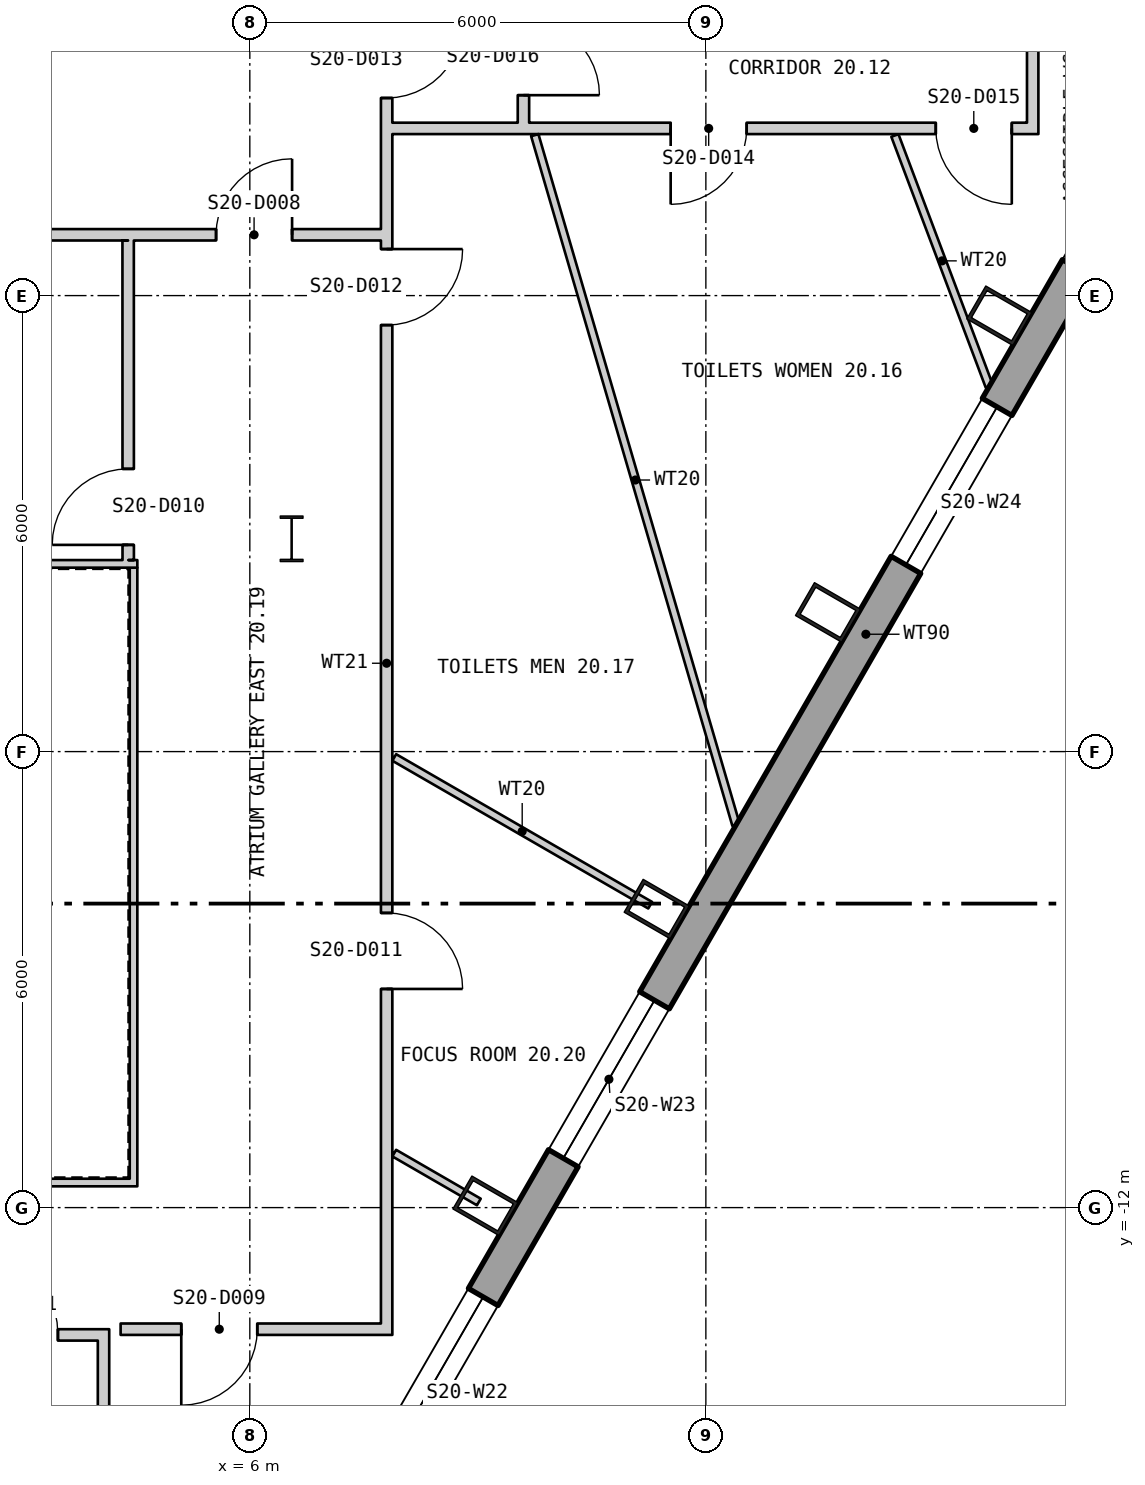
"""IFC4 building model, lengths in metres.
Left out: names, types, materials, properties, quantities, classifications, styles, units other than length and angle.
Written with IfcOpenShell. Run it as: python <this file> out.ifc"""

import sys

from ifc_helpers import new_model, si_unit, direction, frame, frame_2d, origin, origin_2d, place, context, subcontext, project, spatial, polyline, rectangle, hollow_rectangle, i_section, outline, extrude, element, fill, save


model = new_model("IFC4")
c1 = context("Model", 3, precision=1e-05, world=origin(), true_north=direction((0.0, 1.0)))
c2 = subcontext(c1, "Body", "Model", "MODEL_VIEW")
j1 = project(units=[si_unit("LENGTHUNIT", "METRE"), si_unit("PLANEANGLEUNIT", "RADIAN")], contexts=[c1])
p1 = place(None, origin())
s1 = spatial("IfcSite", under=j1, at=p1, CompositionType="ELEMENT")
p2 = place(p1, origin())
s2 = spatial("IfcBuilding", under=s1, at=p2, CompositionType="ELEMENT")
p3 = place(p2, frame((0.0, 0.0, 268.8)))
s3 = spatial("IfcBuildingStorey", under=s2, at=p3, CompositionType="ELEMENT", Elevation=268.8)
for number, where, z_axis, x_axis in (
    (1, (9.1, -11.976, 0.0), (0.0, 0.0, 1.0), (0.5, 0.866, 0.0)),
    (2, (11.353, -8.072, 0.0), (0.0, 0.0, 1.0), (0.5, 0.866, 0.0)),
    (3, (13.607, -4.168, 0.0), (0.0, 0.0, 1.0), (0.5, 0.866, 0.0)),
    (4, (15.861, -0.265, 0.0), (0.0, 0.0, 1.0), (0.5, 0.866, 0.0)),
):
    element("IfcColumn", number, at=place(p3, frame(where, z_axis=z_axis, x_axis=x_axis)), inside=s3, PredefinedType="COLUMN", context=c2, shape_type="SweptSolid", body=[
        extrude(hollow_rectangle(XDim=0.5, YDim=0.7, WallThickness=0.045, at=origin_2d()), origin(), (0.0, 0.0, 1.0), 3.9),
    ])
p4 = place(p3, frame((6.55, -3.2, 0.0), z_axis=(0.0, 0.0, 1.0), x_axis=(1.0, 0.0, 0.0)))
e5 = element("IfcColumn", 5, at=p4, inside=s3, PredefinedType="COLUMN", context=c2, shape_type="SweptSolid", body=[
    extrude(i_section(OverallWidth=0.3, OverallDepth=0.6, WebThickness=0.015, FlangeThickness=0.03, at=origin_2d()), origin(), (0.0, 0.0, 1.0), 3.9),
])
p5 = place(p3, frame((2.67, -24.262, -0.18), z_axis=(0.0, 0.0, 1.0), x_axis=(0.499999764979, 0.866025539474, 0.0)))
e6 = element("IfcWall", 6, at=p5, inside=s3, PredefinedType="SOLIDWALL", context=c2, shape_type="SweptSolid", body=[
    extrude(outline(polyline([(-0.13, -0.225), (45.87, -0.225), (45.61, 0.225), (0.13, 0.225), (-0.13, -0.225)])), origin(), (0.0, 0.0, 1.0), 3.68),
])
p6 = place(p5, frame((1.424, 0.0, 1.08)))
e7 = element("IfcOpeningElement", 7, at=p6, cuts=e6, PredefinedType="OPENING", context=c2, shape_type="SweptSolid", body=[
    extrude(rectangle(XDim=2.4, YDim=2.0, at=frame_2d((1.2, 1.0))), frame((0.0, 0.235, 0.0), z_axis=(0.0, -1.0, 0.0), x_axis=(1.0, 0.0, 0.0)), (0.0, 0.0, 1.0), 0.47),
])
p7 = place(p5, frame((5.893, 0.0, 1.08)))
e8 = element("IfcOpeningElement", 8, at=p7, cuts=e6, PredefinedType="OPENING", context=c2, shape_type="SweptSolid", body=[
    extrude(rectangle(XDim=2.4, YDim=2.0, at=frame_2d((1.2, 1.0))), frame((0.0, 0.235, 0.0), z_axis=(0.0, -1.0, 0.0), x_axis=(1.0, 0.0, 0.0)), (0.0, 0.0, 1.0), 0.47),
])
p8 = place(p5, frame((10.401, 0.0, 1.08)))
e9 = element("IfcOpeningElement", 9, at=p8, cuts=e6, PredefinedType="OPENING", context=c2, shape_type="SweptSolid", body=[
    extrude(rectangle(XDim=2.4, YDim=2.0, at=frame_2d((1.2, 1.0))), frame((0.0, 0.235, 0.0), z_axis=(0.0, -1.0, 0.0), x_axis=(1.0, 0.0, 0.0)), (0.0, 0.0, 1.0), 0.47),
])
p9 = place(p5, frame((14.909, 0.0, 1.08)))
e10 = element("IfcOpeningElement", 10, at=p9, cuts=e6, PredefinedType="OPENING", context=c2, shape_type="SweptSolid", body=[
    extrude(rectangle(XDim=2.4, YDim=2.0, at=frame_2d((1.2, 1.0))), frame((0.0, 0.235, 0.0), z_axis=(0.0, -1.0, 0.0), x_axis=(1.0, 0.0, 0.0)), (0.0, 0.0, 1.0), 0.47),
])
p10 = place(p5, frame((23.924, 0.0, 1.08)))
e11 = element("IfcOpeningElement", 11, at=p10, cuts=e6, PredefinedType="OPENING", context=c2, shape_type="SweptSolid", body=[
    extrude(rectangle(XDim=2.4, YDim=2.0, at=frame_2d((1.2, 1.0))), frame((0.0, 0.235, 0.0), z_axis=(0.0, -1.0, 0.0), x_axis=(1.0, 0.0, 0.0)), (0.0, 0.0, 1.0), 0.47),
])
p11 = place(p5, frame((28.431, 0.0, 1.08)))
e12 = element("IfcOpeningElement", 12, at=p11, cuts=e6, PredefinedType="OPENING", context=c2, shape_type="SweptSolid", body=[
    extrude(rectangle(XDim=2.4, YDim=2.0, at=frame_2d((1.2, 1.0))), frame((0.0, 0.235, 0.0), z_axis=(0.0, -1.0, 0.0), x_axis=(1.0, 0.0, 0.0)), (0.0, 0.0, 1.0), 0.47),
])
p12 = place(p5, frame((32.939, 0.0, 1.08)))
e13 = element("IfcOpeningElement", 13, at=p12, cuts=e6, PredefinedType="OPENING", context=c2, shape_type="SweptSolid", body=[
    extrude(rectangle(XDim=2.4, YDim=2.0, at=frame_2d((1.2, 1.0))), frame((0.0, 0.235, 0.0), z_axis=(0.0, -1.0, 0.0), x_axis=(1.0, 0.0, 0.0)), (0.0, 0.0, 1.0), 0.47),
])
p13 = place(p5, frame((37.447, 0.0, 1.08)))
e14 = element("IfcOpeningElement", 14, at=p13, cuts=e6, PredefinedType="OPENING", context=c2, shape_type="SweptSolid", body=[
    extrude(rectangle(XDim=2.4, YDim=2.0, at=frame_2d((1.2, 1.0))), frame((0.0, 0.235, 0.0), z_axis=(0.0, -1.0, 0.0), x_axis=(1.0, 0.0, 0.0)), (0.0, 0.0, 1.0), 0.47),
])
p14 = place(p5, frame((41.916, 0.0, 1.08)))
e15 = element("IfcOpeningElement", 15, at=p14, cuts=e6, PredefinedType="OPENING", context=c2, shape_type="SweptSolid", body=[
    extrude(rectangle(XDim=2.4, YDim=2.0, at=frame_2d((1.2, 1.0))), frame((0.0, 0.235, 0.0), z_axis=(0.0, -1.0, 0.0), x_axis=(1.0, 0.0, 0.0)), (0.0, 0.0, 1.0), 0.47),
])
p15 = place(p3, frame((-4.52, -11.67, 0.0), z_axis=(0.0, 0.0, 1.0), x_axis=(1.0, 0.0, 0.0)))
e16 = element("IfcWall", 16, at=p15, inside=s3, PredefinedType="PARTITIONING", context=c2, shape_type="SweptSolid", body=[
    extrude(rectangle(XDim=9.04, YDim=0.1, at=frame_2d((4.52, 0.0))), origin(), (0.0, 0.0, 1.0), 3.7),
])
p16 = place(p3, frame((4.47, -11.62, 0.0), z_axis=(0.0, 0.0, 1.0), x_axis=(0.0, 1.0, 0.0)))
e17 = element("IfcWall", 17, at=p16, inside=s3, PredefinedType="PARTITIONING", context=c2, shape_type="SweptSolid", body=[
    extrude(rectangle(XDim=8.04, YDim=0.1, at=frame_2d((4.02, 0.0))), origin(), (0.0, 0.0, 1.0), 3.7),
])
p17 = place(p3, frame((4.52, -3.53, 0.0), z_axis=(0.0, 0.0, 1.0), x_axis=(-1.0, 0.0, 0.0)))
e18 = element("IfcWall", 18, at=p17, inside=s3, PredefinedType="PARTITIONING", context=c2, shape_type="SweptSolid", body=[
    extrude(rectangle(XDim=9.04, YDim=0.1, at=frame_2d((4.52, 0.0))), origin(), (0.0, 0.0, 1.0), 3.7),
])
p18 = place(p3, frame((4.075, -16.15, 0.0), z_axis=(0.0, 0.0, 1.0), x_axis=(0.0, 1.0, 0.0)))
e19 = element("IfcWall", 19, at=p18, inside=s3, PredefinedType="PARTITIONING", context=c2, shape_type="SweptSolid", body=[
    extrude(rectangle(XDim=2.4, YDim=0.15, at=frame_2d((1.2, 0.0))), origin(), (0.0, 0.0, 1.0), 3.7),
])
p19 = place(p3, frame((1.55, -13.675, 0.0), z_axis=(0.0, 0.0, 1.0), x_axis=(1.0, 0.0, 0.0)))
e20 = element("IfcWall", 20, at=p19, inside=s3, PredefinedType="PARTITIONING", context=c2, shape_type="SweptSolid", body=[
    extrude(rectangle(XDim=2.6, YDim=0.15, at=frame_2d((1.3, 0.0))), origin(), (0.0, 0.0, 1.0), 2.79),
])
p20 = place(p19, frame((0.675, 0.0, 0.0)))
e21 = element("IfcOpeningElement", 21, at=p20, cuts=e20, PredefinedType="OPENING", context=c2, shape_type="SweptSolid", body=[
    extrude(rectangle(XDim=1.25, YDim=2.1, at=frame_2d((0.625, 1.05))), frame((0.0, 0.085, 0.0), z_axis=(0.0, -1.0, 0.0), x_axis=(1.0, 0.0, 0.0)), (0.0, 0.0, 1.0), 0.17),
])
p21 = place(p3, frame((-7.725, 0.8, 0.0), z_axis=(0.0, 0.0, 1.0), x_axis=(1.0, 0.0, 0.0)))
e22 = element("IfcWall", 22, at=p21, inside=s3, PredefinedType="PARTITIONING", context=c2, shape_type="SweptSolid", body=[
    extrude(rectangle(XDim=15.45, YDim=0.15, at=frame_2d((7.725, 0.0))), origin(), (0.0, 0.0, 1.0), 3.7),
])
p22 = place(p21, frame((1.168, 0.0, 0.0)))
e23 = element("IfcOpeningElement", 23, at=p22, cuts=e22, PredefinedType="OPENING", context=c2, shape_type="SweptSolid", body=[
    extrude(rectangle(XDim=1.0, YDim=2.1, at=frame_2d((0.5, 1.05))), frame((0.0, 0.085, 0.0), z_axis=(0.0, -1.0, 0.0), x_axis=(1.0, 0.0, 0.0)), (0.0, 0.0, 1.0), 0.17),
])
p23 = place(p21, frame((6.524, 0.0, 0.0)))
e24 = element("IfcOpeningElement", 24, at=p23, cuts=e22, PredefinedType="OPENING", context=c2, shape_type="SweptSolid", body=[
    extrude(rectangle(XDim=1.0, YDim=2.1, at=frame_2d((0.5, 1.05))), frame((0.0, 0.085, 0.0), z_axis=(0.0, -1.0, 0.0), x_axis=(1.0, 0.0, 0.0)), (0.0, 0.0, 1.0), 0.17),
])
p24 = place(p21, frame((13.281, 0.0, 0.0)))
e25 = element("IfcOpeningElement", 25, at=p24, cuts=e22, PredefinedType="OPENING", context=c2, shape_type="SweptSolid", body=[
    extrude(rectangle(XDim=1.0, YDim=2.1, at=frame_2d((0.5, 1.05))), frame((0.0, 0.085, 0.0), z_axis=(0.0, -1.0, 0.0), x_axis=(1.0, 0.0, 0.0)), (0.0, 0.0, 1.0), 0.17),
])
p25 = place(p3, frame((4.3, -13.6, 0.0), z_axis=(0.0, 0.0, 1.0), x_axis=(1.0, 0.0, 0.0)))
e26 = element("IfcWall", 26, at=p25, inside=s3, PredefinedType="PARTITIONING", context=c2, shape_type="SweptSolid", body=[
    extrude(rectangle(XDim=3.425, YDim=0.15, at=frame_2d((1.712, 0.0))), origin(), (0.0, 0.0, 1.0), 2.79),
])
p26 = place(p25, frame((0.798, 0.0, 0.0)))
e27 = element("IfcOpeningElement", 27, at=p26, cuts=e26, PredefinedType="OPENING", context=c2, shape_type="SweptSolid", body=[
    extrude(rectangle(XDim=1.0, YDim=2.1, at=frame_2d((0.5, 1.05))), frame((0.0, 0.085, 0.0), z_axis=(0.0, -1.0, 0.0), x_axis=(1.0, 0.0, 0.0)), (0.0, 0.0, 1.0), 0.17),
])
p27 = place(p3, frame((4.399, 0.725, 0.0), z_axis=(0.0, 0.0, 1.0), x_axis=(0.000237812122, -0.999999971723, 0.0)))
e28 = element("IfcWall", 28, at=p27, inside=s3, PredefinedType="PARTITIONING", context=c2, shape_type="SweptSolid", body=[
    extrude(rectangle(XDim=4.205, YDim=0.15, at=frame_2d((2.103, 0.0))), origin(), (0.0, 0.0, 1.0), 3.7),
])
p28 = place(p27, frame((3.005, 0.0, 0.0)))
e29 = element("IfcOpeningElement", 29, at=p28, cuts=e28, PredefinedType="OPENING", context=c2, shape_type="SweptSolid", body=[
    extrude(rectangle(XDim=1.0, YDim=2.1, at=frame_2d((0.5, 1.05))), frame((0.0, 0.085, 0.0), z_axis=(0.0, -1.0, 0.0), x_axis=(1.0, 0.0, 0.0)), (0.0, 0.0, 1.0), 0.17),
])
p29 = place(p3, frame((7.8, -13.675, 0.0), z_axis=(0.0, 0.0, 1.0), x_axis=(0.0, 1.0, 0.0)))
e30 = element("IfcWall", 30, at=p29, inside=s3, PredefinedType="PARTITIONING", context=c2, shape_type="SweptSolid", body=[
    extrude(rectangle(XDim=17.675, YDim=0.15, at=frame_2d((8.838, 0.0))), origin(), (0.0, 0.0, 1.0), 3.7),
])
p30 = place(p29, frame((4.552, 0.0, 0.0)))
e31 = element("IfcOpeningElement", 31, at=p30, cuts=e30, PredefinedType="OPENING", context=c2, shape_type="SweptSolid", body=[
    extrude(rectangle(XDim=1.0, YDim=2.1, at=frame_2d((0.5, 1.05))), frame((0.0, 0.085, 0.0), z_axis=(0.0, -1.0, 0.0), x_axis=(1.0, 0.0, 0.0)), (0.0, 0.0, 1.0), 0.17),
])
p31 = place(p29, frame((13.287, 0.0, 0.0)))
e32 = element("IfcOpeningElement", 32, at=p31, cuts=e30, PredefinedType="OPENING", context=c2, shape_type="SweptSolid", body=[
    extrude(rectangle(XDim=1.0, YDim=2.1, at=frame_2d((0.5, 1.05))), frame((0.0, 0.085, 0.0), z_axis=(0.0, -1.0, 0.0), x_axis=(1.0, 0.0, 0.0)), (0.0, 0.0, 1.0), 0.17),
])
p32 = place(p29, frame((16.275, 0.0, 0.0)))
e33 = element("IfcOpeningElement", 33, at=p32, cuts=e30, PredefinedType="OPENING", context=c2, shape_type="SweptSolid", body=[
    extrude(rectangle(XDim=1.0, YDim=2.1, at=frame_2d((0.5, 1.05))), frame((0.0, 0.085, 0.0), z_axis=(0.0, -1.0, 0.0), x_axis=(1.0, 0.0, 0.0)), (0.0, 0.0, 1.0), 0.17),
])
p33 = place(p3, frame((7.875, 2.2, 0.0), z_axis=(0.0, 0.0, 1.0), x_axis=(1.0, 0.0, 0.0)))
e34 = element("IfcWall", 34, at=p33, inside=s3, PredefinedType="PARTITIONING", context=c2, shape_type="SweptSolid", body=[
    extrude(rectangle(XDim=8.35, YDim=0.15, at=frame_2d((4.175, 0.0))), origin(), (0.0, 0.0, 1.0), 3.7),
])
p34 = place(p33, frame((3.662, 0.0, 0.0)))
e35 = element("IfcOpeningElement", 35, at=p34, cuts=e34, PredefinedType="OPENING", context=c2, shape_type="SweptSolid", body=[
    extrude(rectangle(XDim=1.0, YDim=2.1, at=frame_2d((0.5, 1.05))), frame((0.0, 0.085, 0.0), z_axis=(0.0, -1.0, 0.0), x_axis=(1.0, 0.0, 0.0)), (0.0, 0.0, 1.0), 0.17),
])
p35 = place(p33, frame((7.15, 0.0, 0.0)))
e36 = element("IfcOpeningElement", 36, at=p35, cuts=e34, PredefinedType="OPENING", context=c2, shape_type="SweptSolid", body=[
    extrude(rectangle(XDim=1.0, YDim=2.1, at=frame_2d((0.5, 1.05))), frame((0.0, 0.085, 0.0), z_axis=(0.0, -1.0, 0.0), x_axis=(1.0, 0.0, 0.0)), (0.0, 0.0, 1.0), 0.17),
])
p36 = place(p3, frame((7.9, -6.077, 0.0), z_axis=(0.0, 0.0, 1.0), x_axis=(0.86601853819, -0.50001189137, 0.0)))
e37 = element("IfcWall", 37, at=p36, inside=s3, PredefinedType="PARTITIONING", context=c2, shape_type="SweptSolid", body=[
    extrude(rectangle(XDim=3.888, YDim=0.1, at=frame_2d((1.944, 0.0))), origin(), (0.0, 0.0, 1.0), 3.7),
])
p37 = place(p3, frame((7.9, -11.283, 0.0), z_axis=(0.0, 0.0, 1.0), x_axis=(0.865887538919, -0.500238712961, 0.0)))
e38 = element("IfcWall", 38, at=p37, inside=s3, PredefinedType="PARTITIONING", context=c2, shape_type="SweptSolid", body=[
    extrude(rectangle(XDim=1.285, YDim=0.1, at=frame_2d((0.643, 0.0))), origin(), (0.0, 0.0, 1.0), 3.7),
])
p38 = place(p3, frame((9.6, 2.275, 0.0), z_axis=(0.0, 0.0, 1.0), x_axis=(0.0, 1.0, 0.0)))
e39 = element("IfcWall", 39, at=p38, inside=s3, PredefinedType="PARTITIONING", context=c2, shape_type="SweptSolid", body=[
    extrude(rectangle(XDim=1.725, YDim=0.15, at=frame_2d((0.863, 0.0))), origin(), (0.0, 0.0, 1.0), 3.2),
])
p39 = place(p38, frame((0.362, 0.0, 0.0)))
e40 = element("IfcOpeningElement", 40, at=p39, cuts=e39, PredefinedType="OPENING", context=c2, shape_type="SweptSolid", body=[
    extrude(rectangle(XDim=1.0, YDim=2.1, at=frame_2d((0.5, 1.05))), frame((0.0, 0.085, 0.0), z_axis=(0.0, -1.0, 0.0), x_axis=(1.0, 0.0, 0.0)), (0.0, 0.0, 1.0), 0.17),
])
p40 = place(p3, frame((9.749, 2.111, 0.0), z_axis=(0.0, 0.0, 1.0), x_axis=(0.280109672534, -0.95996800538, 0.0)))
e41 = element("IfcWall", 41, at=p40, inside=s3, PredefinedType="PARTITIONING", context=c2, shape_type="SweptSolid", body=[
    extrude(rectangle(XDim=9.453, YDim=0.1, at=frame_2d((4.727, 0.0))), origin(), (0.0, 0.0, 1.0), 3.7),
])
p41 = place(p3, frame((14.487, 2.107, 0.0), z_axis=(0.0, 0.0, 1.0), x_axis=(0.352242085743, -0.935908923471, 0.0)))
e42 = element("IfcWall", 42, at=p41, inside=s3, PredefinedType="PARTITIONING", context=c2, shape_type="SweptSolid", body=[
    extrude(rectangle(XDim=3.526, YDim=0.1, at=frame_2d((1.763, 0.0))), origin(), (0.0, 0.0, 1.0), 3.7),
])
p42 = place(p3, frame((16.3, 2.125, 0.0), z_axis=(0.0, 0.0, 1.0), x_axis=(0.0, 1.0, 0.0)))
e43 = element("IfcWall", 43, at=p42, inside=s3, PredefinedType="PARTITIONING", context=c2, shape_type="SweptSolid", body=[
    extrude(rectangle(XDim=10.985, YDim=0.15, at=frame_2d((5.492, 0.0))), origin(), (0.0, 0.0, 1.0), 3.7),
])
p43 = place(p42, frame((6.117, 0.0, 0.0)))
e44 = element("IfcOpeningElement", 44, at=p43, cuts=e43, PredefinedType="OPENING", context=c2, shape_type="SweptSolid", body=[
    extrude(rectangle(XDim=1.0, YDim=2.1, at=frame_2d((0.5, 1.05))), frame((0.0, 0.085, 0.0), z_axis=(0.0, -1.0, 0.0), x_axis=(1.0, 0.0, 0.0)), (0.0, 0.0, 1.0), 0.17),
])
p44 = place(p8, origin())
e45 = element("IfcWindow", 45, at=p44, inside=s3, PartitioningType="SINGLE_PANEL", PredefinedType="WINDOW", context=c2, shape_type="SweptSolid", body=[
    extrude(rectangle(XDim=2.4, YDim=2.0, at=frame_2d((1.2, 1.0))), frame((0.0, 0.105, 0.0), z_axis=(0.0, -1.0, 0.0), x_axis=(1.0, 0.0, 0.0)), (0.0, 0.0, 1.0), 0.06),
])
fill(e9, e45)
p45 = place(p9, origin())
e46 = element("IfcWindow", 46, at=p45, inside=s3, PartitioningType="SINGLE_PANEL", PredefinedType="WINDOW", context=c2, shape_type="SweptSolid", body=[
    extrude(rectangle(XDim=2.4, YDim=2.0, at=frame_2d((1.2, 1.0))), frame((0.0, 0.105, 0.0), z_axis=(0.0, -1.0, 0.0), x_axis=(1.0, 0.0, 0.0)), (0.0, 0.0, 1.0), 0.06),
])
fill(e10, e46)
p46 = place(p10, origin())
e47 = element("IfcWindow", 47, at=p46, inside=s3, PartitioningType="SINGLE_PANEL", PredefinedType="WINDOW", context=c2, shape_type="SweptSolid", body=[
    extrude(rectangle(XDim=2.4, YDim=2.0, at=frame_2d((1.2, 1.0))), frame((0.0, 0.105, 0.0), z_axis=(0.0, -1.0, 0.0), x_axis=(1.0, 0.0, 0.0)), (0.0, 0.0, 1.0), 0.06),
])
fill(e11, e47)
p47 = place(p20, origin())
e48 = element("IfcDoor", 48, at=p47, inside=s3, OperationType="SINGLE_SWING_RIGHT", PredefinedType="DOOR", context=c2, shape_type="SweptSolid", body=[
    extrude(rectangle(XDim=1.25, YDim=2.1, at=frame_2d((0.625, 1.05))), frame((0.0, 0.025, 0.0), z_axis=(0.0, -1.0, 0.0), x_axis=(1.0, 0.0, 0.0)), (0.0, 0.0, 1.0), 0.05),
])
fill(e21, e48)
p48 = place(p24, origin())
e49 = element("IfcDoor", 49, at=p48, inside=s3, OperationType="SINGLE_SWING_LEFT", PredefinedType="DOOR", context=c2, shape_type="SweptSolid", body=[
    extrude(rectangle(XDim=1.0, YDim=2.1, at=frame_2d((0.5, 1.05))), frame((0.0, 0.025, 0.0), z_axis=(0.0, -1.0, 0.0), x_axis=(1.0, 0.0, 0.0)), (0.0, 0.0, 1.0), 0.05),
])
fill(e25, e49)
p49 = place(p26, origin())
e50 = element("IfcDoor", 50, at=p49, inside=s3, OperationType="SINGLE_SWING_LEFT", PredefinedType="DOOR", context=c2, shape_type="SweptSolid", body=[
    extrude(rectangle(XDim=1.0, YDim=2.1, at=frame_2d((0.5, 1.05))), frame((0.0, 0.025, 0.0), z_axis=(0.0, -1.0, 0.0), x_axis=(1.0, 0.0, 0.0)), (0.0, 0.0, 1.0), 0.05),
])
fill(e27, e50)
p50 = place(p28, origin())
e51 = element("IfcDoor", 51, at=p50, inside=s3, OperationType="SINGLE_SWING_RIGHT", PredefinedType="DOOR", context=c2, shape_type="SweptSolid", body=[
    extrude(rectangle(XDim=1.0, YDim=2.1, at=frame_2d((0.5, 1.05))), frame((0.0, 0.025, 0.0), z_axis=(0.0, -1.0, 0.0), x_axis=(1.0, 0.0, 0.0)), (0.0, 0.0, 1.0), 0.05),
])
fill(e29, e51)
p51 = place(p30, origin())
e52 = element("IfcDoor", 52, at=p51, inside=s3, OperationType="SINGLE_SWING_LEFT", PredefinedType="DOOR", context=c2, shape_type="SweptSolid", body=[
    extrude(rectangle(XDim=1.0, YDim=2.1, at=frame_2d((0.5, 1.05))), frame((0.0, 0.025, 0.0), z_axis=(0.0, -1.0, 0.0), x_axis=(1.0, 0.0, 0.0)), (0.0, 0.0, 1.0), 0.05),
])
fill(e31, e52)
p52 = place(p31, origin())
e53 = element("IfcDoor", 53, at=p52, inside=s3, OperationType="SINGLE_SWING_RIGHT", PredefinedType="DOOR", context=c2, shape_type="SweptSolid", body=[
    extrude(rectangle(XDim=1.0, YDim=2.1, at=frame_2d((0.5, 1.05))), frame((0.0, 0.025, 0.0), z_axis=(0.0, -1.0, 0.0), x_axis=(1.0, 0.0, 0.0)), (0.0, 0.0, 1.0), 0.05),
])
fill(e32, e53)
p53 = place(p32, origin())
e54 = element("IfcDoor", 54, at=p53, inside=s3, OperationType="SINGLE_SWING_RIGHT", PredefinedType="DOOR", context=c2, shape_type="SweptSolid", body=[
    extrude(rectangle(XDim=1.0, YDim=2.1, at=frame_2d((0.5, 1.05))), frame((0.0, 0.025, 0.0), z_axis=(0.0, -1.0, 0.0), x_axis=(1.0, 0.0, 0.0)), (0.0, 0.0, 1.0), 0.05),
])
fill(e33, e54)
p54 = place(p34, origin())
e55 = element("IfcDoor", 55, at=p54, inside=s3, OperationType="SINGLE_SWING_LEFT", PredefinedType="DOOR", context=c2, shape_type="SweptSolid", body=[
    extrude(rectangle(XDim=1.0, YDim=2.1, at=frame_2d((0.5, 1.05))), frame((0.0, 0.025, 0.0), z_axis=(0.0, -1.0, 0.0), x_axis=(1.0, 0.0, 0.0)), (0.0, 0.0, 1.0), 0.05),
])
fill(e35, e55)
p55 = place(p35, origin())
e56 = element("IfcDoor", 56, at=p55, inside=s3, OperationType="SINGLE_SWING_RIGHT", PredefinedType="DOOR", context=c2, shape_type="SweptSolid", body=[
    extrude(rectangle(XDim=1.0, YDim=2.1, at=frame_2d((0.5, 1.05))), frame((0.0, 0.025, 0.0), z_axis=(0.0, -1.0, 0.0), x_axis=(1.0, 0.0, 0.0)), (0.0, 0.0, 1.0), 0.05),
])
fill(e36, e56)
p56 = place(p39, origin())
e57 = element("IfcDoor", 57, at=p56, inside=s3, OperationType="SINGLE_SWING_LEFT", PredefinedType="DOOR", context=c2, shape_type="SweptSolid", body=[
    extrude(rectangle(XDim=1.0, YDim=2.1, at=frame_2d((0.5, 1.05))), frame((0.0, 0.025, 0.0), z_axis=(0.0, -1.0, 0.0), x_axis=(1.0, 0.0, 0.0)), (0.0, 0.0, 1.0), 0.05),
])
fill(e40, e57)
save(model, sys.argv[1])
